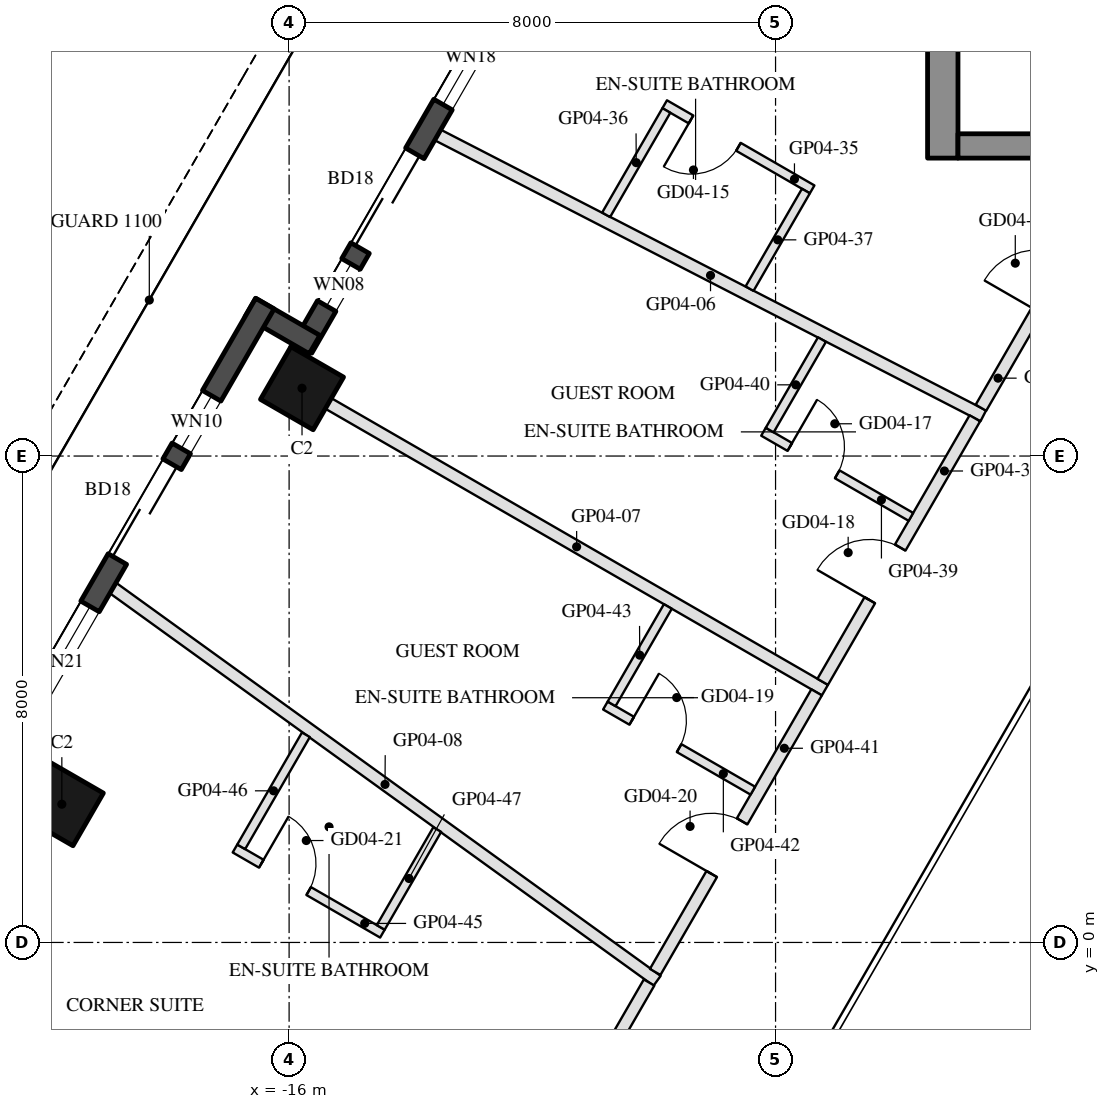
"""IFC4 building model, lengths in metres.
Left out: names, types, materials, properties, quantities, classifications, styles, units other than length and angle.
Written with IfcOpenShell. Run it as: python <this file> out.ifc"""

import sys

from ifc_helpers import new_model, si_unit, direction, frame, frame_2d, origin, origin_2d, place, context, subcontext, project, spatial, rectangle, hollow_rectangle, extrude, element, fill, save


model = new_model("IFC4")
c1 = context("Model", 3, precision=1e-05, world=origin(), true_north=direction((0.0, 1.0)))
c2 = subcontext(c1, "Body", "Model", "MODEL_VIEW")
j1 = project(units=[si_unit("LENGTHUNIT", "METRE"), si_unit("PLANEANGLEUNIT", "RADIAN")], contexts=[c1])
p1 = place(None, origin())
s1 = spatial("IfcSite", under=j1, at=p1, CompositionType="ELEMENT")
p2 = place(p1, origin())
s2 = spatial("IfcBuilding", under=s1, at=p2, CompositionType="ELEMENT")
p3 = place(p2, frame((0.0, 0.0, 72.4)))
s3 = spatial("IfcBuildingStorey", under=s2, at=p3, CompositionType="ELEMENT", Elevation=72.4)
for number, where, z_axis, x_axis in (
    (1, (-15.788, 9.115, 0.0), (0.0, 0.0, 1.0), (0.5, 0.866, 0.0)),
    (2, (-19.738, 2.273, 0.0), (0.0, 0.0, 1.0), (0.5, 0.866, 0.0)),
):
    element("IfcColumn", number, at=place(p3, frame(where, z_axis=z_axis, x_axis=x_axis)), inside=s3, PredefinedType="COLUMN", context=c2, shape_type="SweptSolid", body=[
        extrude(hollow_rectangle(XDim=1.0, YDim=1.0, WallThickness=0.045, at=origin_2d()), origin(), (0.0, 0.0, 1.0), 3.7),
    ])
p4 = place(p3, frame((-12.409, 15.617, 0.0), z_axis=(0.0, 0.0, 1.0), x_axis=(-0.500003597184, -0.866023326939, 0.0)))
e3 = element("IfcWall", 3, at=p4, inside=s3, PredefinedType="SOLIDWALL", context=c2, shape_type="SweptSolid", body=[
    extrude(rectangle(XDim=6.74, YDim=0.35, at=frame_2d((3.37, 0.0))), origin(), (0.0, 0.0, 1.0), 3.55),
])
p5 = place(p4, frame((0.32, 0.0, 0.3)))
e4 = element("IfcOpeningElement", 4, at=p5, cuts=e3, PredefinedType="OPENING", context=c2, shape_type="SweptSolid", body=[
    extrude(rectangle(XDim=1.8, YDim=2.65, at=frame_2d((0.9, 1.325))), frame((0.0, 0.185, 0.0), z_axis=(0.0, -1.0, 0.0), x_axis=(1.0, 0.0, 0.0)), (0.0, 0.0, 1.0), 0.37),
])
p6 = place(p4, frame((3.047, 0.0, 0.0)))
e5 = element("IfcOpeningElement", 5, at=p6, cuts=e3, PredefinedType="OPENING", context=c2, shape_type="SweptSolid", body=[
    extrude(rectangle(XDim=1.8, YDim=2.4, at=frame_2d((0.9, 1.2))), frame((0.0, 0.185, 0.0), z_axis=(0.0, -1.0, 0.0), x_axis=(1.0, 0.0, 0.0)), (0.0, 0.0, 1.0), 0.37),
])
p7 = place(p4, frame((5.147, 0.0, 0.3)))
e6 = element("IfcOpeningElement", 6, at=p7, cuts=e3, PredefinedType="OPENING", context=c2, shape_type="SweptSolid", body=[
    extrude(rectangle(XDim=0.8, YDim=2.65, at=frame_2d((0.4, 1.325))), frame((0.0, 0.185, 0.0), z_axis=(0.0, -1.0, 0.0), x_axis=(1.0, 0.0, 0.0)), (0.0, 0.0, 1.0), 0.37),
])
p8 = place(p3, frame((-15.581, 9.833, 0.0), z_axis=(0.0, 0.0, 1.0), x_axis=(-0.866055662726, 0.499947586314, 0.0)))
e7 = element("IfcWall", 7, at=p8, inside=s3, PredefinedType="SOLIDWALL", context=c2, shape_type="SweptSolid", body=[
    extrude(rectangle(XDim=1.22, YDim=0.35, at=frame_2d((0.61, 0.0))), origin(), (0.0, 0.0, 1.0), 3.55),
])
p9 = place(p3, frame((-16.398, 10.507, 0.0), z_axis=(0.0, 0.0, 1.0), x_axis=(-0.499999142773, -0.866025898704, 0.0)))
e8 = element("IfcWall", 8, at=p9, inside=s3, PredefinedType="SOLIDWALL", context=c2, shape_type="SweptSolid", body=[
    extrude(rectangle(XDim=9.7, YDim=0.35, at=frame_2d((4.85, 0.0))), origin(), (0.0, 0.0, 1.0), 3.55),
])
p10 = place(p9, frame((3.051, 0.0, 0.0)))
e9 = element("IfcOpeningElement", 9, at=p10, cuts=e8, PredefinedType="OPENING", context=c2, shape_type="SweptSolid", body=[
    extrude(rectangle(XDim=1.8, YDim=2.4, at=frame_2d((0.9, 1.2))), frame((0.0, 0.185, 0.0), z_axis=(0.0, -1.0, 0.0), x_axis=(1.0, 0.0, 0.0)), (0.0, 0.0, 1.0), 0.37),
])
p11 = place(p9, frame((1.75, 0.0, 0.3)))
e10 = element("IfcOpeningElement", 10, at=p11, cuts=e8, PredefinedType="OPENING", context=c2, shape_type="SweptSolid", body=[
    extrude(rectangle(XDim=1.0, YDim=2.65, at=frame_2d((0.5, 1.325))), frame((0.0, 0.185, 0.0), z_axis=(0.0, -1.0, 0.0), x_axis=(1.0, 0.0, 0.0)), (0.0, 0.0, 1.0), 0.37),
])
p12 = place(p9, frame((5.751, 0.0, 0.3)))
e11 = element("IfcOpeningElement", 11, at=p12, cuts=e8, PredefinedType="OPENING", context=c2, shape_type="SweptSolid", body=[
    extrude(rectangle(XDim=2.1, YDim=2.65, at=frame_2d((1.05, 1.325))), frame((0.0, 0.185, 0.0), z_axis=(0.0, -1.0, 0.0), x_axis=(1.0, 0.0, 0.0)), (0.0, 0.0, 1.0), 0.37),
])
p13 = place(p3, frame((-5.25, 12.9, 0.0), z_axis=(0.0, 0.0, 1.0), x_axis=(0.0, 1.0, 0.0)))
e12 = element("IfcWall", 12, at=p13, inside=s3, PredefinedType="SHEAR", context=c2, shape_type="SweptSolid", body=[
    extrude(rectangle(XDim=14.837, YDim=0.5, at=frame_2d((7.418, 0.0))), origin(), (0.0, 0.0, 1.0), 3.5),
])
p14 = place(p3, frame((5.0, 13.1, 0.0), z_axis=(0.0, 0.0, 1.0), x_axis=(-1.0, 0.0, 0.0)))
e13 = element("IfcWall", 13, at=p14, inside=s3, PredefinedType="SHEAR", context=c2, shape_type="SweptSolid", body=[
    extrude(rectangle(XDim=10.0, YDim=0.4, at=frame_2d((5.0, 0.0))), origin(), (0.0, 0.0, 1.0), 3.5),
])
p15 = place(p14, frame((3.55, 0.0, 0.0)))
e14 = element("IfcOpeningElement", 14, at=p15, cuts=e13, PredefinedType="OPENING", context=c2, shape_type="SweptSolid", body=[
    extrude(rectangle(XDim=1.1, YDim=2.1, at=frame_2d((0.55, 1.05))), frame((0.0, 0.21, 0.0), z_axis=(0.0, -1.0, 0.0), x_axis=(1.0, 0.0, 0.0)), (0.0, 0.0, 1.0), 0.42),
])
p16 = place(p14, frame((5.85, 0.0, 0.0)))
e15 = element("IfcOpeningElement", 15, at=p16, cuts=e13, PredefinedType="OPENING", context=c2, shape_type="SweptSolid", body=[
    extrude(rectangle(XDim=1.4, YDim=2.1, at=frame_2d((0.7, 1.05))), frame((0.0, 0.21, 0.0), z_axis=(0.0, -1.0, 0.0), x_axis=(1.0, 0.0, 0.0)), (0.0, 0.0, 1.0), 0.42),
])
p17 = place(p3, frame((-13.556, 13.281, 0.0), z_axis=(0.0, 0.0, 1.0), x_axis=(0.889110909618, -0.457691807223, 0.0)))
e16 = element("IfcWall", 16, at=p17, inside=s3, PredefinedType="PARTITIONING", context=c2, shape_type="SweptSolid", body=[
    extrude(rectangle(XDim=10.092, YDim=0.2, at=frame_2d((5.046, 0.0))), origin(), (0.0, 0.0, 1.0), 2.96),
])
p18 = place(p3, frame((-15.354, 8.865, 0.0), z_axis=(0.0, 0.0, 1.0), x_axis=(0.866018301787, -0.500012300819, 0.0)))
e17 = element("IfcWall", 17, at=p18, inside=s3, PredefinedType="PARTITIONING", context=c2, shape_type="SweptSolid", body=[
    extrude(rectangle(XDim=9.43, YDim=0.2, at=frame_2d((4.715, 0.0))), origin(), (0.0, 0.0, 1.0), 2.95),
])
p19 = place(p3, frame((-18.897, 5.83, 0.0), z_axis=(0.0, 0.0, 1.0), x_axis=(0.810787705843, -0.585340324985, 0.0)))
e18 = element("IfcWall", 18, at=p19, inside=s3, PredefinedType="PARTITIONING", context=c2, shape_type="SweptSolid", body=[
    extrude(rectangle(XDim=11.037, YDim=0.2, at=frame_2d((5.519, 0.0))), origin(), (0.0, 0.0, 1.0), 2.96),
])
p20 = place(p3, frame((-4.622, 8.794, 0.0), z_axis=(0.0, 0.0, 1.0), x_axis=(0.499979668266, 0.866037141998, 0.0)))
e19 = element("IfcWall", 19, at=p20, inside=s3, PredefinedType="PARTITIONING", context=c2, shape_type="SweptSolid", body=[
    extrude(rectangle(XDim=4.683, YDim=0.2, at=frame_2d((2.342, 0.0))), origin(), (0.0, 0.0, 1.0), 2.95),
])
p21 = place(p20, frame((1.842, 0.0, 0.0)))
e20 = element("IfcOpeningElement", 20, at=p21, cuts=e19, PredefinedType="OPENING", context=c2, shape_type="SweptSolid", body=[
    extrude(rectangle(XDim=1.0, YDim=2.1, at=frame_2d((0.5, 1.05))), frame((0.0, 0.11, 0.0), z_axis=(0.0, -1.0, 0.0), x_axis=(1.0, 0.0, 0.0)), (0.0, 0.0, 1.0), 0.22),
])
p22 = place(p3, frame((-7.398, 12.386, 0.0), z_axis=(0.0, 0.0, 1.0), x_axis=(-0.866034573852, 0.49998411664, 0.0)))
e21 = element("IfcWall", 21, at=p22, inside=s3, PredefinedType="PARTITIONING", context=c2, shape_type="SweptSolid", body=[
    extrude(rectangle(XDim=2.8, YDim=0.15, at=frame_2d((1.4, 0.0))), origin(), (0.0, 0.0, 1.0), 3.55),
])
p23 = place(p22, frame((1.4, 0.0, 0.0)))
e22 = element("IfcOpeningElement", 22, at=p23, cuts=e21, PredefinedType="OPENING", context=c2, shape_type="SweptSolid", body=[
    extrude(rectangle(XDim=0.9, YDim=2.1, at=frame_2d((0.45, 1.05))), frame((0.0, 0.085, 0.0), z_axis=(0.0, -1.0, 0.0), x_axis=(1.0, 0.0, 0.0)), (0.0, 0.0, 1.0), 0.17),
])
p24 = place(p3, frame((-9.796, 13.683, 0.0), z_axis=(0.0, 0.0, 1.0), x_axis=(-0.499981976687, -0.866035809299, 0.0)))
e23 = element("IfcWall", 23, at=p24, inside=s3, PredefinedType="PARTITIONING", context=c2, shape_type="SweptSolid", body=[
    extrude(rectangle(XDim=1.981, YDim=0.15, at=frame_2d((0.991, 0.0))), origin(), (0.0, 0.0, 1.0), 3.55),
])
p25 = place(p3, frame((-7.501, 12.358, 0.0), z_axis=(0.0, 0.0, 1.0), x_axis=(-0.499992292652, -0.866029853578, 0.0)))
e24 = element("IfcWall", 24, at=p25, inside=s3, PredefinedType="PARTITIONING", context=c2, shape_type="SweptSolid", body=[
    extrude(rectangle(XDim=1.854, YDim=0.15, at=frame_2d((0.927, 0.0))), origin(), (0.0, 0.0, 1.0), 3.55),
])
p26 = place(p3, frame((-7.225, 4.287, 0.0), z_axis=(0.0, 0.0, 1.0), x_axis=(0.49997441339, 0.866040175716, 0.0)))
e25 = element("IfcWall", 25, at=p26, inside=s3, PredefinedType="PARTITIONING", context=c2, shape_type="SweptSolid", body=[
    extrude(rectangle(XDim=5.005, YDim=0.2, at=frame_2d((2.502, 0.0))), origin(), (0.0, 0.0, 1.0), 2.95),
])
p27 = place(p26, frame((1.55, 0.0, 0.0)))
e26 = element("IfcOpeningElement", 26, at=p27, cuts=e25, PredefinedType="OPENING", context=c2, shape_type="SweptSolid", body=[
    extrude(rectangle(XDim=1.0, YDim=2.1, at=frame_2d((0.5, 1.05))), frame((0.0, 0.11, 0.0), z_axis=(0.0, -1.0, 0.0), x_axis=(1.0, 0.0, 0.0)), (0.0, 0.0, 1.0), 0.22),
])
p28 = place(p3, frame((-8.198, 8.399, 0.0), z_axis=(0.0, 0.0, 1.0), x_axis=(0.866034573852, -0.49998411664, 0.0)))
e27 = element("IfcWall", 27, at=p28, inside=s3, PredefinedType="PARTITIONING", context=c2, shape_type="SweptSolid", body=[
    extrude(rectangle(XDim=2.8, YDim=0.15, at=frame_2d((1.4, 0.0))), origin(), (0.0, 0.0, 1.0), 3.55),
])
p29 = place(p28, frame((0.5, 0.0, 0.0)))
e28 = element("IfcOpeningElement", 28, at=p29, cuts=e27, PredefinedType="OPENING", context=c2, shape_type="SweptSolid", body=[
    extrude(rectangle(XDim=0.9, YDim=2.1, at=frame_2d((0.45, 1.05))), frame((0.0, 0.085, 0.0), z_axis=(0.0, -1.0, 0.0), x_axis=(1.0, 0.0, 0.0)), (0.0, 0.0, 1.0), 0.17),
])
p30 = place(p3, frame((-7.237, 9.915, 0.0), z_axis=(0.0, 0.0, 1.0), x_axis=(-0.50005036918, -0.865996321171, 0.0)))
e29 = element("IfcWall", 29, at=p30, inside=s3, PredefinedType="PARTITIONING", context=c2, shape_type="SweptSolid", body=[
    extrude(rectangle(XDim=1.719, YDim=0.15, at=frame_2d((0.859, 0.0))), origin(), (0.0, 0.0, 1.0), 2.95),
])
p31 = place(p3, frame((-9.979, -0.485, 0.0), z_axis=(0.0, 0.0, 1.0), x_axis=(0.500006381002, 0.86602171968, 0.0)))
e30 = element("IfcWall", 30, at=p31, inside=s3, PredefinedType="PARTITIONING", context=c2, shape_type="SweptSolid", body=[
    extrude(rectangle(XDim=5.31, YDim=0.2, at=frame_2d((2.655, 0.0))), origin(), (0.0, 0.0, 1.0), 2.95),
])
p32 = place(p31, frame((1.86, 0.0, 0.0)))
e31 = element("IfcOpeningElement", 31, at=p32, cuts=e30, PredefinedType="OPENING", context=c2, shape_type="SweptSolid", body=[
    extrude(rectangle(XDim=1.0, YDim=2.1, at=frame_2d((0.5, 1.05))), frame((0.0, 0.11, 0.0), z_axis=(0.0, -1.0, 0.0), x_axis=(1.0, 0.0, 0.0)), (0.0, 0.0, 1.0), 0.22),
])
p33 = place(p3, frame((-10.799, 3.896, 0.0), z_axis=(0.0, 0.0, 1.0), x_axis=(0.866034573852, -0.49998411664, 0.0)))
e32 = element("IfcWall", 32, at=p33, inside=s3, PredefinedType="PARTITIONING", context=c2, shape_type="SweptSolid", body=[
    extrude(rectangle(XDim=2.8, YDim=0.15, at=frame_2d((1.4, 0.0))), origin(), (0.0, 0.0, 1.0), 3.55),
])
p34 = place(p33, frame((0.5, 0.0, 0.0)))
e33 = element("IfcOpeningElement", 33, at=p34, cuts=e32, PredefinedType="OPENING", context=c2, shape_type="SweptSolid", body=[
    extrude(rectangle(XDim=0.9, YDim=2.1, at=frame_2d((0.45, 1.05))), frame((0.0, 0.085, 0.0), z_axis=(0.0, -1.0, 0.0), x_axis=(1.0, 0.0, 0.0)), (0.0, 0.0, 1.0), 0.17),
])
p35 = place(p3, frame((-9.771, 5.526, 0.0), z_axis=(0.0, 0.0, 1.0), x_axis=(-0.500042316284, -0.866000971088, 0.0)))
e34 = element("IfcWall", 34, at=p35, inside=s3, PredefinedType="PARTITIONING", context=c2, shape_type="SweptSolid", body=[
    extrude(rectangle(XDim=1.85, YDim=0.15, at=frame_2d((0.925, 0.0))), origin(), (0.0, 0.0, 1.0), 2.95),
])
p36 = place(p3, frame((-12.269, -4.45, 0.0), z_axis=(0.0, 0.0, 1.0), x_axis=(0.499996027077, 0.86602769754, 0.0)))
e35 = element("IfcWall", 35, at=p36, inside=s3, PredefinedType="PARTITIONING", context=c2, shape_type="SweptSolid", body=[
    extrude(rectangle(XDim=4.377, YDim=0.2, at=frame_2d((2.189, 0.0))), origin(), (0.0, 0.0, 1.0), 2.95),
])
p37 = place(p36, frame((1.689, 0.0, 0.0)))
e36 = element("IfcOpeningElement", 36, at=p37, cuts=e35, PredefinedType="OPENING", context=c2, shape_type="SweptSolid", body=[
    extrude(rectangle(XDim=1.0, YDim=2.1, at=frame_2d((0.5, 1.05))), frame((0.0, 0.11, 0.0), z_axis=(0.0, -1.0, 0.0), x_axis=(1.0, 0.0, 0.0)), (0.0, 0.0, 1.0), 0.22),
])
p38 = place(p3, frame((-16.89, 1.545, 0.0), z_axis=(0.0, 0.0, 1.0), x_axis=(0.866034573852, -0.49998411664, 0.0)))
e37 = element("IfcWall", 37, at=p38, inside=s3, PredefinedType="PARTITIONING", context=c2, shape_type="SweptSolid", body=[
    extrude(rectangle(XDim=2.8, YDim=0.15, at=frame_2d((1.4, 0.0))), origin(), (0.0, 0.0, 1.0), 3.55),
])
p39 = place(p38, frame((0.5, 0.0, 0.0)))
e38 = element("IfcOpeningElement", 38, at=p39, cuts=e37, PredefinedType="OPENING", context=c2, shape_type="SweptSolid", body=[
    extrude(rectangle(XDim=0.9, YDim=2.1, at=frame_2d((0.45, 1.05))), frame((0.0, 0.085, 0.0), z_axis=(0.0, -1.0, 0.0), x_axis=(1.0, 0.0, 0.0)), (0.0, 0.0, 1.0), 0.17),
])
p40 = place(p3, frame((-15.724, 3.415, 0.0), z_axis=(0.0, 0.0, 1.0), x_axis=(-0.50001378257, -0.866017446268, 0.0)))
e39 = element("IfcWall", 39, at=p40, inside=s3, PredefinedType="PARTITIONING", context=c2, shape_type="SweptSolid", body=[
    extrude(rectangle(XDim=2.128, YDim=0.15, at=frame_2d((1.064, 0.0))), origin(), (0.0, 0.0, 1.0), 3.55),
])
p41 = place(p3, frame((-13.564, 1.856, 0.0), z_axis=(0.0, 0.0, 1.0), x_axis=(-0.499984136491, -0.866034562392, 0.0)))
e40 = element("IfcWall", 40, at=p41, inside=s3, PredefinedType="PARTITIONING", context=c2, shape_type="SweptSolid", body=[
    extrude(rectangle(XDim=1.857, YDim=0.15, at=frame_2d((0.929, 0.0))), origin(), (0.0, 0.0, 1.0), 3.55),
])
p42 = place(p5, origin())
e41 = element("IfcWindow", 41, at=p42, inside=s3, PartitioningType="SINGLE_PANEL", PredefinedType="WINDOW", context=c2, shape_type="SweptSolid", body=[
    extrude(rectangle(XDim=1.8, YDim=2.65, at=frame_2d((0.9, 1.325))), frame((0.0, 0.03, 0.0), z_axis=(0.0, -1.0, 0.0), x_axis=(1.0, 0.0, 0.0)), (0.0, 0.0, 1.0), 0.06),
])
fill(e4, e41)
p43 = place(p6, frame((1.8, 0.0, 0.0), z_axis=(0.0, 0.0, 1.0), x_axis=(-1.0, 0.0, 0.0)))
e42 = element("IfcDoor", 42, at=p43, inside=s3, OperationType="SLIDING_TO_LEFT", PredefinedType="DOOR", context=c2, shape_type="SweptSolid", body=[
    extrude(rectangle(XDim=1.8, YDim=2.4, at=frame_2d((0.9, 1.2))), frame((0.0, 0.025, 0.0), z_axis=(0.0, -1.0, 0.0), x_axis=(1.0, 0.0, 0.0)), (0.0, 0.0, 1.0), 0.05),
])
fill(e5, e42)
p44 = place(p7, origin())
e43 = element("IfcWindow", 43, at=p44, inside=s3, PartitioningType="SINGLE_PANEL", PredefinedType="WINDOW", context=c2, shape_type="SweptSolid", body=[
    extrude(rectangle(XDim=0.8, YDim=2.65, at=frame_2d((0.4, 1.325))), frame((0.0, 0.03, 0.0), z_axis=(0.0, -1.0, 0.0), x_axis=(1.0, 0.0, 0.0)), (0.0, 0.0, 1.0), 0.06),
])
fill(e6, e43)
p45 = place(p10, frame((1.8, 0.0, 0.0), z_axis=(0.0, 0.0, 1.0), x_axis=(-1.0, 0.0, 0.0)))
e44 = element("IfcDoor", 44, at=p45, inside=s3, OperationType="SLIDING_TO_LEFT", PredefinedType="DOOR", context=c2, shape_type="SweptSolid", body=[
    extrude(rectangle(XDim=1.8, YDim=2.4, at=frame_2d((0.9, 1.2))), frame((0.0, 0.025, 0.0), z_axis=(0.0, -1.0, 0.0), x_axis=(1.0, 0.0, 0.0)), (0.0, 0.0, 1.0), 0.05),
])
fill(e9, e44)
p46 = place(p11, origin())
e45 = element("IfcWindow", 45, at=p46, inside=s3, PartitioningType="SINGLE_PANEL", PredefinedType="WINDOW", context=c2, shape_type="SweptSolid", body=[
    extrude(rectangle(XDim=1.0, YDim=2.65, at=frame_2d((0.5, 1.325))), frame((0.0, 0.03, 0.0), z_axis=(0.0, -1.0, 0.0), x_axis=(1.0, 0.0, 0.0)), (0.0, 0.0, 1.0), 0.06),
])
fill(e10, e45)
p47 = place(p12, origin())
e46 = element("IfcWindow", 46, at=p47, inside=s3, PartitioningType="SINGLE_PANEL", PredefinedType="WINDOW", context=c2, shape_type="SweptSolid", body=[
    extrude(rectangle(XDim=2.1, YDim=2.65, at=frame_2d((1.05, 1.325))), frame((0.0, 0.03, 0.0), z_axis=(0.0, -1.0, 0.0), x_axis=(1.0, 0.0, 0.0)), (0.0, 0.0, 1.0), 0.06),
])
fill(e11, e46)
p48 = place(p23, origin())
e47 = element("IfcDoor", 47, at=p48, inside=s3, OperationType="SINGLE_SWING_RIGHT", PredefinedType="DOOR", context=c2, shape_type="SweptSolid", body=[
    extrude(rectangle(XDim=0.9, YDim=2.1, at=frame_2d((0.45, 1.05))), frame((0.0, 0.025, 0.0), z_axis=(0.0, -1.0, 0.0), x_axis=(1.0, 0.0, 0.0)), (0.0, 0.0, 1.0), 0.05),
])
fill(e22, e47)
p49 = place(p29, origin())
e48 = element("IfcDoor", 48, at=p49, inside=s3, OperationType="SINGLE_SWING_LEFT", PredefinedType="DOOR", context=c2, shape_type="SweptSolid", body=[
    extrude(rectangle(XDim=0.9, YDim=2.1, at=frame_2d((0.45, 1.05))), frame((0.0, 0.025, 0.0), z_axis=(0.0, -1.0, 0.0), x_axis=(1.0, 0.0, 0.0)), (0.0, 0.0, 1.0), 0.05),
])
fill(e28, e48)
p50 = place(p27, origin())
e49 = element("IfcDoor", 49, at=p50, inside=s3, OperationType="SINGLE_SWING_LEFT", PredefinedType="DOOR", context=c2, shape_type="SweptSolid", body=[
    extrude(rectangle(XDim=1.0, YDim=2.1, at=frame_2d((0.5, 1.05))), frame((0.0, 0.025, 0.0), z_axis=(0.0, -1.0, 0.0), x_axis=(1.0, 0.0, 0.0)), (0.0, 0.0, 1.0), 0.05),
])
fill(e26, e49)
p51 = place(p34, origin())
e50 = element("IfcDoor", 50, at=p51, inside=s3, OperationType="SINGLE_SWING_LEFT", PredefinedType="DOOR", context=c2, shape_type="SweptSolid", body=[
    extrude(rectangle(XDim=0.9, YDim=2.1, at=frame_2d((0.45, 1.05))), frame((0.0, 0.025, 0.0), z_axis=(0.0, -1.0, 0.0), x_axis=(1.0, 0.0, 0.0)), (0.0, 0.0, 1.0), 0.05),
])
fill(e33, e50)
p52 = place(p32, origin())
e51 = element("IfcDoor", 51, at=p52, inside=s3, OperationType="SINGLE_SWING_LEFT", PredefinedType="DOOR", context=c2, shape_type="SweptSolid", body=[
    extrude(rectangle(XDim=1.0, YDim=2.1, at=frame_2d((0.5, 1.05))), frame((0.0, 0.025, 0.0), z_axis=(0.0, -1.0, 0.0), x_axis=(1.0, 0.0, 0.0)), (0.0, 0.0, 1.0), 0.05),
])
fill(e31, e51)
p53 = place(p39, origin())
e52 = element("IfcDoor", 52, at=p53, inside=s3, OperationType="SINGLE_SWING_LEFT", PredefinedType="DOOR", context=c2, shape_type="SweptSolid", body=[
    extrude(rectangle(XDim=0.9, YDim=2.1, at=frame_2d((0.45, 1.05))), frame((0.0, 0.025, 0.0), z_axis=(0.0, -1.0, 0.0), x_axis=(1.0, 0.0, 0.0)), (0.0, 0.0, 1.0), 0.05),
])
fill(e38, e52)
save(model, sys.argv[1])
